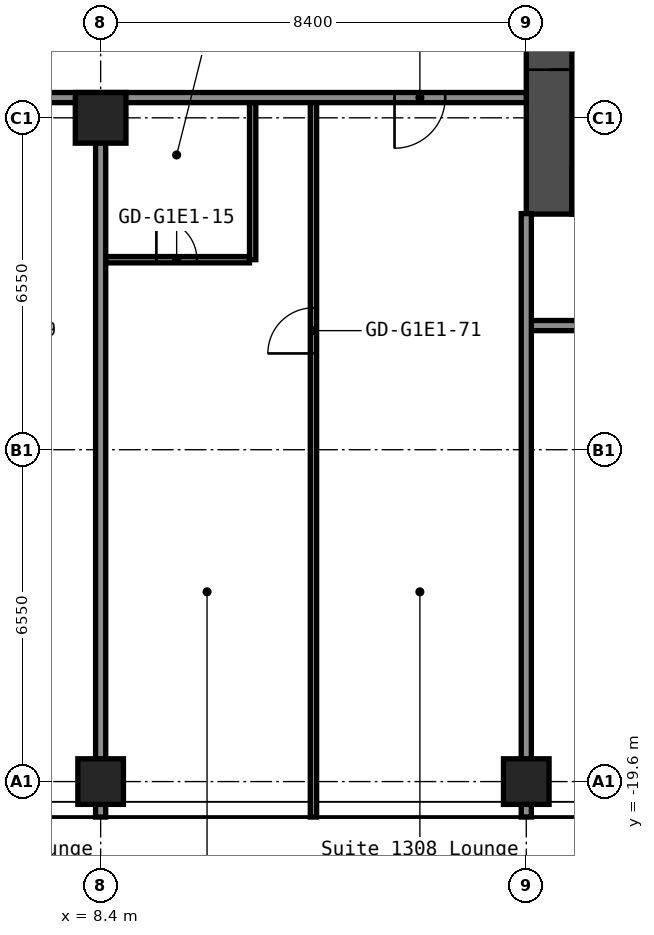
"""IFC4 building model, lengths in metres.
Left out: names, types, materials, properties, quantities, classifications, styles, units other than length and angle.
Written with IfcOpenShell. Run it as: python <this file> out.ifc"""

import sys

from ifc_helpers import new_model, si_unit, direction, frame, frame_2d, origin, origin_2d, place, context, subcontext, project, spatial, rectangle, hollow_rectangle, extrude, element, fill, save


model = new_model("IFC4")
c1 = context("Model", 3, precision=1e-05, world=origin(), true_north=direction((0.0, 1.0)))
c2 = subcontext(c1, "Body", "Model", "MODEL_VIEW")
j1 = project(units=[si_unit("LENGTHUNIT", "METRE"), si_unit("PLANEANGLEUNIT", "RADIAN")], contexts=[c1])
p1 = place(None, origin())
s1 = spatial("IfcSite", under=j1, at=p1, CompositionType="ELEMENT")
p2 = place(p1, origin())
s2 = spatial("IfcBuilding", under=s1, at=p2, CompositionType="ELEMENT")
p3 = place(p2, frame((0.0, 0.0, 48.6)))
s3 = spatial("IfcBuildingStorey", under=s2, at=p3, CompositionType="ELEMENT", Elevation=48.6)
p4 = place(p3, frame((8.4, -19.6, 0.0), z_axis=(0.0, 0.0, 1.0), x_axis=(1.0, 0.0, 0.0)))
e1 = element("IfcColumn", 1, at=p4, inside=s3, PredefinedType="COLUMN", context=c2, shape_type="SweptSolid", body=[
    extrude(hollow_rectangle(XDim=0.9, YDim=0.9, WallThickness=0.036, at=origin_2d()), origin(), (0.0, 0.0, 1.0), 2.8),
])
p5 = place(p3, frame((8.4, -6.5, 0.0), z_axis=(0.0, 0.0, 1.0), x_axis=(1.0, 0.0, 0.0)))
e2 = element("IfcColumn", 2, at=p5, inside=s3, PredefinedType="COLUMN", context=c2, shape_type="SweptSolid", body=[
    extrude(hollow_rectangle(XDim=1.0, YDim=1.0, WallThickness=0.04, at=origin_2d()), origin(), (0.0, 0.0, 1.0), 2.8),
])
p6 = place(p3, frame((16.8, -19.6, 0.0), z_axis=(0.0, 0.0, 1.0), x_axis=(1.0, 0.0, 0.0)))
e3 = element("IfcColumn", 3, at=p6, inside=s3, PredefinedType="COLUMN", context=c2, shape_type="SweptSolid", body=[
    extrude(hollow_rectangle(XDim=0.9, YDim=0.9, WallThickness=0.036, at=origin_2d()), origin(), (0.0, 0.0, 1.0), 2.8),
])
p7 = place(p3, frame((17.25, -8.4, 0.0), z_axis=(0.0, 0.0, 1.0), x_axis=(0.0, 1.0, 0.0)))
e4 = element("IfcWall", 4, at=p7, inside=s3, PredefinedType="SHEAR", context=c2, shape_type="SweptSolid", body=[
    extrude(rectangle(XDim=16.8, YDim=0.9, at=frame_2d((8.4, 0.0))), origin(), (0.0, 0.0, 1.0), 2.8),
])
p8 = place(p7, frame((12.75, 0.0, 0.0)))
e5 = element("IfcOpeningElement", 5, at=p8, cuts=e4, PredefinedType="OPENING", context=c2, shape_type="SweptSolid", body=[
    extrude(rectangle(XDim=1.2, YDim=2.1, at=frame_2d((0.6, 1.05))), frame((0.0, 0.46, 0.0), z_axis=(0.0, -1.0, 0.0), x_axis=(1.0, 0.0, 0.0)), (0.0, 0.0, 1.0), 0.92),
])
p9 = place(p7, frame((2.85, 0.0, 0.0)))
e6 = element("IfcOpeningElement", 6, at=p9, cuts=e4, PredefinedType="OPENING", context=c2, shape_type="SweptSolid", body=[
    extrude(rectangle(XDim=1.2, YDim=2.1, at=frame_2d((0.6, 1.05))), frame((0.0, 0.46, 0.0), z_axis=(0.0, -1.0, 0.0), x_axis=(1.0, 0.0, 0.0)), (0.0, 0.0, 1.0), 0.92),
])
p10 = place(p3, frame((17.7, -7.95, 0.0), z_axis=(0.0, 0.0, 1.0), x_axis=(1.0, 0.0, 0.0)))
e7 = element("IfcWall", 7, at=p10, inside=s3, PredefinedType="SHEAR", context=c2, shape_type="SweptSolid", body=[
    extrude(rectangle(XDim=15.0, YDim=0.9, at=frame_2d((7.5, 0.0))), origin(), (0.0, 0.0, 1.0), 2.8),
])
p11 = place(p10, frame((2.55, 0.0, 0.0)))
e8 = element("IfcOpeningElement", 8, at=p11, cuts=e7, PredefinedType="OPENING", context=c2, shape_type="SweptSolid", body=[
    extrude(rectangle(XDim=1.0, YDim=2.1, at=frame_2d((0.5, 1.05))), frame((0.0, 0.46, 0.0), z_axis=(0.0, -1.0, 0.0), x_axis=(1.0, 0.0, 0.0)), (0.0, 0.0, 1.0), 0.92),
])
p12 = place(p3, frame((16.8, -10.6, 0.0), z_axis=(0.0, 0.0, 1.0), x_axis=(1.0, 0.0, 0.0)))
e9 = element("IfcWall", 9, at=p12, inside=s3, PredefinedType="PARTITIONING", context=c2, shape_type="SweptSolid", body=[
    extrude(rectangle(XDim=34.3, YDim=0.2, at=frame_2d((17.15, 0.0))), origin(), (0.0, 0.0, 1.0), 2.8),
])
p13 = place(p12, frame((3.4, 0.0, 0.0)))
e10 = element("IfcOpeningElement", 10, at=p13, cuts=e9, PredefinedType="OPENING", context=c2, shape_type="SweptSolid", body=[
    extrude(rectangle(XDim=1.6, YDim=2.1, at=frame_2d((0.8, 1.05))), frame((0.0, 0.11, 0.0), z_axis=(0.0, -1.0, 0.0), x_axis=(1.0, 0.0, 0.0)), (0.0, 0.0, 1.0), 0.22),
])
p14 = place(p12, frame((11.8, 0.0, 0.0)))
e11 = element("IfcOpeningElement", 11, at=p14, cuts=e9, PredefinedType="OPENING", context=c2, shape_type="SweptSolid", body=[
    extrude(rectangle(XDim=1.6, YDim=2.1, at=frame_2d((0.8, 1.05))), frame((0.0, 0.11, 0.0), z_axis=(0.0, -1.0, 0.0), x_axis=(1.0, 0.0, 0.0)), (0.0, 0.0, 1.0), 0.22),
])
p15 = place(p12, frame((20.2, 0.0, 0.0)))
e12 = element("IfcOpeningElement", 12, at=p15, cuts=e9, PredefinedType="OPENING", context=c2, shape_type="SweptSolid", body=[
    extrude(rectangle(XDim=1.6, YDim=2.1, at=frame_2d((0.8, 1.05))), frame((0.0, 0.11, 0.0), z_axis=(0.0, -1.0, 0.0), x_axis=(1.0, 0.0, 0.0)), (0.0, 0.0, 1.0), 0.22),
])
p16 = place(p12, frame((28.8, 0.0, 0.0)))
e13 = element("IfcOpeningElement", 13, at=p16, cuts=e9, PredefinedType="OPENING", context=c2, shape_type="SweptSolid", body=[
    extrude(rectangle(XDim=1.6, YDim=2.1, at=frame_2d((0.8, 1.05))), frame((0.0, 0.11, 0.0), z_axis=(0.0, -1.0, 0.0), x_axis=(1.0, 0.0, 0.0)), (0.0, 0.0, 1.0), 0.22),
])
p17 = place(p3, frame((8.5, -9.3, 0.0), z_axis=(0.0, 0.0, 1.0), x_axis=(1.0, 0.0, 0.0)))
e14 = element("IfcWall", 14, at=p17, inside=s3, PredefinedType="PARTITIONING", context=c2, shape_type="SweptSolid", body=[
    extrude(rectangle(XDim=2.837, YDim=0.125, at=frame_2d((1.419, 0.0))), origin(), (0.0, 0.0, 1.0), 2.8),
])
p18 = place(p17, frame((1.0, 0.0, 0.0)))
e15 = element("IfcOpeningElement", 15, at=p18, cuts=e14, PredefinedType="OPENING", context=c2, shape_type="SweptSolid", body=[
    extrude(rectangle(XDim=0.8, YDim=2.1, at=frame_2d((0.4, 1.05))), frame((0.0, 0.073, 0.0), z_axis=(0.0, -1.0, 0.0), x_axis=(1.0, 0.0, 0.0)), (0.0, 0.0, 1.0), 0.145),
])
p19 = place(p3, frame((-16.8, -6.1, 0.0), z_axis=(0.0, 0.0, 1.0), x_axis=(1.0, 0.0, 0.0)))
e16 = element("IfcWall", 16, at=p19, inside=s3, PredefinedType="PARTITIONING", context=c2, shape_type="SweptSolid", body=[
    extrude(rectangle(XDim=33.6, YDim=0.2, at=frame_2d((16.8, 0.0))), origin(), (0.0, 0.0, 1.0), 2.8),
])
p20 = place(p19, frame((5.8, 0.0, 0.0)))
e17 = element("IfcOpeningElement", 17, at=p20, cuts=e16, PredefinedType="OPENING", context=c2, shape_type="SweptSolid", body=[
    extrude(rectangle(XDim=1.0, YDim=2.1, at=frame_2d((0.5, 1.05))), frame((0.0, 0.11, 0.0), z_axis=(0.0, -1.0, 0.0), x_axis=(1.0, 0.0, 0.0)), (0.0, 0.0, 1.0), 0.22),
])
p21 = place(p19, frame((10.0, 0.0, 0.0)))
e18 = element("IfcOpeningElement", 18, at=p21, cuts=e16, PredefinedType="OPENING", context=c2, shape_type="SweptSolid", body=[
    extrude(rectangle(XDim=1.0, YDim=2.1, at=frame_2d((0.5, 1.05))), frame((0.0, 0.11, 0.0), z_axis=(0.0, -1.0, 0.0), x_axis=(1.0, 0.0, 0.0)), (0.0, 0.0, 1.0), 0.22),
])
p22 = place(p19, frame((22.6, 0.0, 0.0)))
e19 = element("IfcOpeningElement", 19, at=p22, cuts=e16, PredefinedType="OPENING", context=c2, shape_type="SweptSolid", body=[
    extrude(rectangle(XDim=1.0, YDim=2.1, at=frame_2d((0.5, 1.05))), frame((0.0, 0.11, 0.0), z_axis=(0.0, -1.0, 0.0), x_axis=(1.0, 0.0, 0.0)), (0.0, 0.0, 1.0), 0.22),
])
p23 = place(p19, frame((31.0, 0.0, 0.0)))
e20 = element("IfcOpeningElement", 20, at=p23, cuts=e16, PredefinedType="OPENING", context=c2, shape_type="SweptSolid", body=[
    extrude(rectangle(XDim=1.0, YDim=2.1, at=frame_2d((0.5, 1.05))), frame((0.0, 0.11, 0.0), z_axis=(0.0, -1.0, 0.0), x_axis=(1.0, 0.0, 0.0)), (0.0, 0.0, 1.0), 0.22),
])
p24 = place(p3, frame((8.4, -20.3, 0.0), z_axis=(0.0, 0.0, 1.0), x_axis=(0.0, 1.0, 0.0)))
e21 = element("IfcWall", 21, at=p24, inside=s3, PredefinedType="PARTITIONING", context=c2, shape_type="SweptSolid", body=[
    extrude(rectangle(XDim=13.31, YDim=0.2, at=frame_2d((6.655, 0.0))), origin(), (0.0, 0.0, 1.0), 2.8),
])
p25 = place(p3, frame((11.4, -9.3, 0.0), z_axis=(0.0, 0.0, 1.0), x_axis=(0.0, 1.0, 0.0)))
e22 = element("IfcWall", 22, at=p25, inside=s3, PredefinedType="PARTITIONING", context=c2, shape_type="SweptSolid", body=[
    extrude(rectangle(XDim=3.1, YDim=0.125, at=frame_2d((1.55, 0.0))), origin(), (0.0, 0.0, 1.0), 2.8),
])
p26 = place(p3, frame((12.6, -20.3, 0.0), z_axis=(0.0, 0.0, 1.0), x_axis=(0.0, 1.0, 0.0)))
e23 = element("IfcWall", 23, at=p26, inside=s3, PredefinedType="PARTITIONING", context=c2, shape_type="SweptSolid", body=[
    extrude(rectangle(XDim=14.1, YDim=0.125, at=frame_2d((7.05, 0.0))), origin(), (0.0, 0.0, 1.0), 2.8),
])
p27 = place(p26, frame((9.15, 0.0, 0.0)))
e24 = element("IfcOpeningElement", 24, at=p27, cuts=e23, PredefinedType="OPENING", context=c2, shape_type="SweptSolid", body=[
    extrude(rectangle(XDim=0.9, YDim=2.1, at=frame_2d((0.45, 1.05))), frame((0.0, 0.073, 0.0), z_axis=(0.0, -1.0, 0.0), x_axis=(1.0, 0.0, 0.0)), (0.0, 0.0, 1.0), 0.145),
])
p28 = place(p3, frame((16.8, -20.3, 0.0), z_axis=(0.0, 0.0, 1.0), x_axis=(0.0, 1.0, 0.0)))
e25 = element("IfcWall", 25, at=p28, inside=s3, PredefinedType="PARTITIONING", context=c2, shape_type="SweptSolid", body=[
    extrude(rectangle(XDim=11.91, YDim=0.2, at=frame_2d((5.955, 0.0))), origin(), (0.0, 0.0, 1.0), 2.8),
])
p29 = place(p9, origin())
e26 = element("IfcDoor", 26, at=p29, inside=s3, OperationType="DOUBLE_DOOR_SINGLE_SWING", PredefinedType="DOOR", context=c2, shape_type="SweptSolid", body=[
    extrude(rectangle(XDim=1.2, YDim=2.1, at=frame_2d((0.6, 1.05))), frame((0.0, 0.025, 0.0), z_axis=(0.0, -1.0, 0.0), x_axis=(1.0, 0.0, 0.0)), (0.0, 0.0, 1.0), 0.05),
])
fill(e6, e26)
p30 = place(p18, origin())
e27 = element("IfcDoor", 27, at=p30, inside=s3, OperationType="SINGLE_SWING_RIGHT", PredefinedType="DOOR", context=c2, shape_type="SweptSolid", body=[
    extrude(rectangle(XDim=0.8, YDim=2.1, at=frame_2d((0.4, 1.05))), frame((0.0, 0.025, 0.0), z_axis=(0.0, -1.0, 0.0), x_axis=(1.0, 0.0, 0.0)), (0.0, 0.0, 1.0), 0.05),
])
fill(e15, e27)
p31 = place(p23, origin())
e28 = element("IfcDoor", 28, at=p31, inside=s3, OperationType="SINGLE_SWING_LEFT", PredefinedType="DOOR", context=c2, shape_type="SweptSolid", body=[
    extrude(rectangle(XDim=1.0, YDim=2.1, at=frame_2d((0.5, 1.05))), frame((0.0, 0.025, 0.0), z_axis=(0.0, -1.0, 0.0), x_axis=(1.0, 0.0, 0.0)), (0.0, 0.0, 1.0), 0.05),
])
fill(e20, e28)
p32 = place(p27, origin())
e29 = element("IfcDoor", 29, at=p32, inside=s3, OperationType="SINGLE_SWING_RIGHT", PredefinedType="DOOR", context=c2, shape_type="SweptSolid", body=[
    extrude(rectangle(XDim=0.9, YDim=2.1, at=frame_2d((0.45, 1.05))), frame((0.0, 0.025, 0.0), z_axis=(0.0, -1.0, 0.0), x_axis=(1.0, 0.0, 0.0)), (0.0, 0.0, 1.0), 0.05),
])
fill(e24, e29)
save(model, sys.argv[1])
